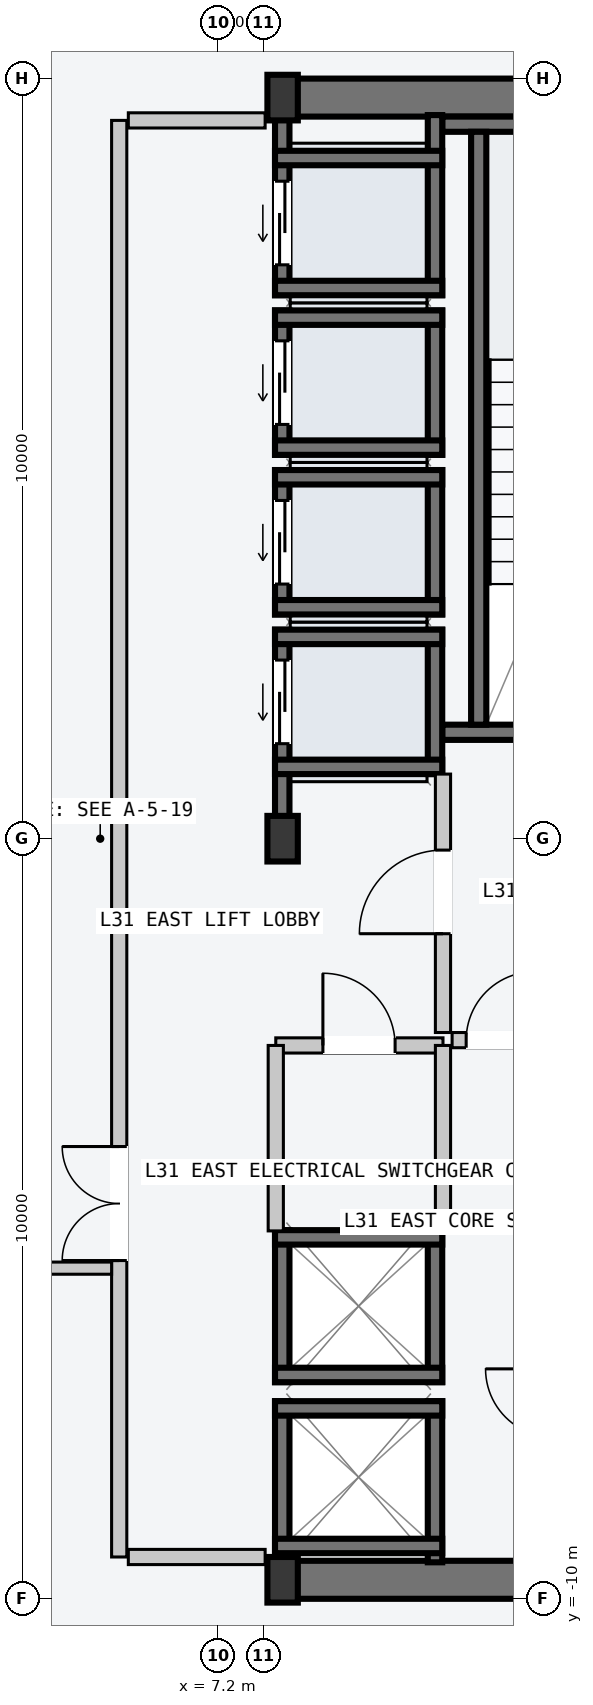
"""IFC4 building model, lengths in metres.
Left out: names, types, materials, properties, quantities, classifications, styles, units other than length and angle.
Written with IfcOpenShell. Run it as: python <this file> out.ifc"""

import sys

from ifc_helpers import new_model, si_unit, direction, frame, frame_2d, origin, origin_2d, place, context, subcontext, project, spatial, rectangle, i_section, extrude, element, fill, save


model = new_model("IFC4")
c1 = context("Model", 3, precision=1e-05, world=origin(), true_north=direction((0.0, 1.0)))
c2 = subcontext(c1, "Body", "Model", "MODEL_VIEW")
j1 = project(units=[si_unit("LENGTHUNIT", "METRE"), si_unit("PLANEANGLEUNIT", "RADIAN")], contexts=[c1])
p1 = place(None, origin())
s1 = spatial("IfcSite", under=j1, at=p1, CompositionType="ELEMENT")
p2 = place(p1, origin())
s2 = spatial("IfcBuilding", under=s1, at=p2, CompositionType="ELEMENT")
p3 = place(p2, frame((0.0, 0.0, 120.6)))
s3 = spatial("IfcBuildingStorey", under=s2, at=p3, CompositionType="ELEMENT", Elevation=120.6)
for number, where, z_axis, x_axis in (
    (1, (8.07, -9.75, -0.2), (0.0, 0.0, 1.0), (1.0, 0.0, 0.0)),
    (2, (8.07, 9.75, -0.2), (0.0, 0.0, 1.0), (1.0, 0.0, 0.0)),
):
    element("IfcWall", number, at=place(p3, frame(where, z_axis=z_axis, x_axis=x_axis)), inside=s3, PredefinedType="SHEAR", context=c2, shape_type="SweptSolid", body=[
        extrude(rectangle(XDim=6.46, YDim=0.5, at=frame_2d((3.23, 0.0))), origin(), (0.0, 0.0, 1.0), 3.6),
    ])
p4 = place(p3, frame((10.15, 1.4, -0.2), z_axis=(0.0, 0.0, 1.0), x_axis=(1.0, 0.0, 0.0)))
e3 = element("IfcWall", 3, at=p4, inside=s3, PredefinedType="SOLIDWALL", context=c2, shape_type="SweptSolid", body=[
    extrude(rectangle(XDim=4.1, YDim=0.2, at=frame_2d((2.05, 0.0))), origin(), (0.0, 0.0, 1.0), 3.6),
])
p5 = place(p4, frame((1.5, 0.0, 0.2)))
e4 = element("IfcOpeningElement", 4, at=p5, cuts=e3, PredefinedType="OPENING", context=c2, shape_type="SweptSolid", body=[
    extrude(rectangle(XDim=1.12, YDim=2.18, at=frame_2d((0.56, 1.09))), frame((0.0, 0.11, 0.0), z_axis=(0.0, -1.0, 0.0), x_axis=(1.0, 0.0, 0.0)), (0.0, 0.0, 1.0), 0.22),
])
p6 = place(p3, frame((10.15, 9.4, -0.2), z_axis=(0.0, 0.0, 1.0), x_axis=(1.0, 0.0, 0.0)))
e5 = element("IfcWall", 5, at=p6, inside=s3, PredefinedType="SOLIDWALL", context=c2, shape_type="SweptSolid", body=[
    extrude(rectangle(XDim=4.1, YDim=0.2, at=frame_2d((2.05, 0.0))), origin(), (0.0, 0.0, 1.0), 3.6),
])
p7 = place(p3, frame((10.63, 1.5, -0.2), z_axis=(0.0, 0.0, 1.0), x_axis=(0.0, 1.0, 0.0)))
e6 = element("IfcWall", 6, at=p7, inside=s3, PredefinedType="SOLIDWALL", context=c2, shape_type="SweptSolid", body=[
    extrude(rectangle(XDim=7.8, YDim=0.2, at=frame_2d((3.9, 0.0))), origin(), (0.0, 0.0, 1.0), 3.6),
])
for number, where, z_axis, x_axis in (
    (7, (8.05, -9.75, 0.0), (0.0, 0.0, 1.0), (1.0, 0.0, 0.0)),
    (8, (8.05, 0.0, 0.0), (0.0, 0.0, 1.0), (1.0, 0.0, 0.0)),
    (9, (8.05, 9.75, 0.0), (0.0, 0.0, 1.0), (1.0, 0.0, 0.0)),
):
    element("IfcColumn", number, at=place(p3, frame(where, z_axis=z_axis, x_axis=x_axis)), inside=s3, PredefinedType="COLUMN", context=c2, shape_type="SweptSolid", body=[
        extrude(i_section(OverallWidth=0.4, OverallDepth=0.6, WebThickness=0.022, FlangeThickness=0.036, at=origin_2d()), origin(), (0.0, 0.0, 1.0), 3.6),
    ])
p8 = place(p3, frame((8.045, 0.21, -0.2), z_axis=(0.0, 0.0, 1.0), x_axis=(0.0, 1.0, 0.0)))
e10 = element("IfcWall", 10, at=p8, inside=s3, PredefinedType="SOLIDWALL", context=c2, shape_type="SweptSolid", body=[
    extrude(rectangle(XDim=2.54, YDim=0.19, at=frame_2d((1.27, 0.0))), origin(), (0.0, 0.0, 1.0), 3.6),
])
p9 = place(p8, frame((1.04, 0.0, 0.2)))
e11 = element("IfcOpeningElement", 11, at=p9, cuts=e10, PredefinedType="OPENING", context=c2, shape_type="SweptSolid", body=[
    extrude(rectangle(XDim=1.1, YDim=2.2, at=frame_2d((0.55, 1.1))), frame((0.0, 0.105, 0.0), z_axis=(0.0, -1.0, 0.0), x_axis=(1.0, 0.0, 0.0)), (0.0, 0.0, 1.0), 0.21),
])
p10 = place(p3, frame((10.055, 0.85, -0.2), z_axis=(0.0, 0.0, 1.0), x_axis=(0.0, 1.0, 0.0)))
e12 = element("IfcWall", 12, at=p10, inside=s3, PredefinedType="SOLIDWALL", context=c2, shape_type="SweptSolid", body=[
    extrude(rectangle(XDim=1.9, YDim=0.19, at=frame_2d((0.95, 0.0))), origin(), (0.0, 0.0, 1.0), 3.6),
])
for number, where, z_axis, x_axis in (
    (13, (7.95, 2.655, -0.2), (0.0, 0.0, 1.0), (1.0, 0.0, 0.0)),
    (14, (7.95, 0.945, -0.2), (0.0, 0.0, 1.0), (1.0, 0.0, 0.0)),
):
    element("IfcWall", number, at=place(p3, frame(where, z_axis=z_axis, x_axis=x_axis)), inside=s3, PredefinedType="SOLIDWALL", context=c2, shape_type="SweptSolid", body=[
        extrude(rectangle(XDim=2.2, YDim=0.19, at=frame_2d((1.1, 0.0))), origin(), (0.0, 0.0, 1.0), 3.6),
    ])
p11 = place(p3, frame((8.045, 2.95, -0.2), z_axis=(0.0, 0.0, 1.0), x_axis=(0.0, 1.0, 0.0)))
e15 = element("IfcWall", 15, at=p11, inside=s3, PredefinedType="SOLIDWALL", context=c2, shape_type="SweptSolid", body=[
    extrude(rectangle(XDim=1.9, YDim=0.19, at=frame_2d((0.95, 0.0))), origin(), (0.0, 0.0, 1.0), 3.6),
])
p12 = place(p11, frame((0.4, 0.0, 0.2)))
e16 = element("IfcOpeningElement", 16, at=p12, cuts=e15, PredefinedType="OPENING", context=c2, shape_type="SweptSolid", body=[
    extrude(rectangle(XDim=1.1, YDim=2.2, at=frame_2d((0.55, 1.1))), frame((0.0, 0.105, 0.0), z_axis=(0.0, -1.0, 0.0), x_axis=(1.0, 0.0, 0.0)), (0.0, 0.0, 1.0), 0.21),
])
p13 = place(p3, frame((10.055, 2.95, -0.2), z_axis=(0.0, 0.0, 1.0), x_axis=(0.0, 1.0, 0.0)))
e17 = element("IfcWall", 17, at=p13, inside=s3, PredefinedType="SOLIDWALL", context=c2, shape_type="SweptSolid", body=[
    extrude(rectangle(XDim=1.9, YDim=0.19, at=frame_2d((0.95, 0.0))), origin(), (0.0, 0.0, 1.0), 3.6),
])
for number, where, z_axis, x_axis in (
    (18, (7.95, 4.755, -0.2), (0.0, 0.0, 1.0), (1.0, 0.0, 0.0)),
    (19, (7.95, 3.045, -0.2), (0.0, 0.0, 1.0), (1.0, 0.0, 0.0)),
):
    element("IfcWall", number, at=place(p3, frame(where, z_axis=z_axis, x_axis=x_axis)), inside=s3, PredefinedType="SOLIDWALL", context=c2, shape_type="SweptSolid", body=[
        extrude(rectangle(XDim=2.2, YDim=0.19, at=frame_2d((1.1, 0.0))), origin(), (0.0, 0.0, 1.0), 3.6),
    ])
p14 = place(p3, frame((8.045, 5.05, -0.2), z_axis=(0.0, 0.0, 1.0), x_axis=(0.0, 1.0, 0.0)))
e20 = element("IfcWall", 20, at=p14, inside=s3, PredefinedType="SOLIDWALL", context=c2, shape_type="SweptSolid", body=[
    extrude(rectangle(XDim=1.9, YDim=0.19, at=frame_2d((0.95, 0.0))), origin(), (0.0, 0.0, 1.0), 3.6),
])
p15 = place(p14, frame((0.4, 0.0, 0.2)))
e21 = element("IfcOpeningElement", 21, at=p15, cuts=e20, PredefinedType="OPENING", context=c2, shape_type="SweptSolid", body=[
    extrude(rectangle(XDim=1.1, YDim=2.2, at=frame_2d((0.55, 1.1))), frame((0.0, 0.105, 0.0), z_axis=(0.0, -1.0, 0.0), x_axis=(1.0, 0.0, 0.0)), (0.0, 0.0, 1.0), 0.21),
])
p16 = place(p3, frame((10.055, 5.05, -0.2), z_axis=(0.0, 0.0, 1.0), x_axis=(0.0, 1.0, 0.0)))
e22 = element("IfcWall", 22, at=p16, inside=s3, PredefinedType="SOLIDWALL", context=c2, shape_type="SweptSolid", body=[
    extrude(rectangle(XDim=1.9, YDim=0.19, at=frame_2d((0.95, 0.0))), origin(), (0.0, 0.0, 1.0), 3.6),
])
for number, where, z_axis, x_axis in (
    (23, (7.95, 6.855, -0.2), (0.0, 0.0, 1.0), (1.0, 0.0, 0.0)),
    (24, (7.95, 5.145, -0.2), (0.0, 0.0, 1.0), (1.0, 0.0, 0.0)),
):
    element("IfcWall", number, at=place(p3, frame(where, z_axis=z_axis, x_axis=x_axis)), inside=s3, PredefinedType="SOLIDWALL", context=c2, shape_type="SweptSolid", body=[
        extrude(rectangle(XDim=2.2, YDim=0.19, at=frame_2d((1.1, 0.0))), origin(), (0.0, 0.0, 1.0), 3.6),
    ])
p17 = place(p3, frame((8.045, 7.15, -0.2), z_axis=(0.0, 0.0, 1.0), x_axis=(0.0, 1.0, 0.0)))
e25 = element("IfcWall", 25, at=p17, inside=s3, PredefinedType="SOLIDWALL", context=c2, shape_type="SweptSolid", body=[
    extrude(rectangle(XDim=2.37, YDim=0.19, at=frame_2d((1.185, 0.0))), origin(), (0.0, 0.0, 1.0), 3.6),
])
p18 = place(p17, frame((0.4, 0.0, 0.2)))
e26 = element("IfcOpeningElement", 26, at=p18, cuts=e25, PredefinedType="OPENING", context=c2, shape_type="SweptSolid", body=[
    extrude(rectangle(XDim=1.1, YDim=2.2, at=frame_2d((0.55, 1.1))), frame((0.0, 0.105, 0.0), z_axis=(0.0, -1.0, 0.0), x_axis=(1.0, 0.0, 0.0)), (0.0, 0.0, 1.0), 0.21),
])
p19 = place(p3, frame((10.055, 7.15, -0.2), z_axis=(0.0, 0.0, 1.0), x_axis=(0.0, 1.0, 0.0)))
e27 = element("IfcWall", 27, at=p19, inside=s3, PredefinedType="SOLIDWALL", context=c2, shape_type="SweptSolid", body=[
    extrude(rectangle(XDim=2.37, YDim=0.19, at=frame_2d((1.185, 0.0))), origin(), (0.0, 0.0, 1.0), 3.6),
])
for number, where, z_axis, x_axis in (
    (28, (7.95, 8.955, -0.2), (0.0, 0.0, 1.0), (1.0, 0.0, 0.0)),
    (29, (7.95, 7.245, -0.2), (0.0, 0.0, 1.0), (1.0, 0.0, 0.0)),
):
    element("IfcWall", number, at=place(p3, frame(where, z_axis=z_axis, x_axis=x_axis)), inside=s3, PredefinedType="SOLIDWALL", context=c2, shape_type="SweptSolid", body=[
        extrude(rectangle(XDim=2.2, YDim=0.19, at=frame_2d((1.1, 0.0))), origin(), (0.0, 0.0, 1.0), 3.6),
    ])
for number, where, z_axis, x_axis in (
    (30, (8.045, -9.52, -0.2), (0.0, 0.0, 1.0), (0.0, 1.0, 0.0)),
    (31, (10.055, -9.52, -0.2), (0.0, 0.0, 1.0), (0.0, 1.0, 0.0)),
):
    element("IfcWall", number, at=place(p3, frame(where, z_axis=z_axis, x_axis=x_axis)), inside=s3, PredefinedType="SOLIDWALL", context=c2, shape_type="SweptSolid", body=[
        extrude(rectangle(XDim=2.12, YDim=0.19, at=frame_2d((1.06, 0.0))), origin(), (0.0, 0.0, 1.0), 3.6),
    ])
for number, where, z_axis, x_axis in (
    (32, (7.95, -7.495, -0.2), (0.0, 0.0, 1.0), (1.0, 0.0, 0.0)),
    (33, (7.95, -9.305, -0.2), (0.0, 0.0, 1.0), (1.0, 0.0, 0.0)),
):
    element("IfcWall", number, at=place(p3, frame(where, z_axis=z_axis, x_axis=x_axis)), inside=s3, PredefinedType="SOLIDWALL", context=c2, shape_type="SweptSolid", body=[
        extrude(rectangle(XDim=2.2, YDim=0.19, at=frame_2d((1.1, 0.0))), origin(), (0.0, 0.0, 1.0), 3.6),
    ])
for number, where, z_axis, x_axis in (
    (34, (8.045, -7.15, -0.2), (0.0, 0.0, 1.0), (0.0, 1.0, 0.0)),
    (35, (10.055, -7.15, -0.2), (0.0, 0.0, 1.0), (0.0, 1.0, 0.0)),
):
    element("IfcWall", number, at=place(p3, frame(where, z_axis=z_axis, x_axis=x_axis)), inside=s3, PredefinedType="SOLIDWALL", context=c2, shape_type="SweptSolid", body=[
        extrude(rectangle(XDim=2.0, YDim=0.19, at=frame_2d((1.0, 0.0))), origin(), (0.0, 0.0, 1.0), 3.6),
    ])
for number, where, z_axis, x_axis in (
    (36, (7.95, -5.245, -0.2), (0.0, 0.0, 1.0), (1.0, 0.0, 0.0)),
    (37, (7.95, -7.055, -0.2), (0.0, 0.0, 1.0), (1.0, 0.0, 0.0)),
):
    element("IfcWall", number, at=place(p3, frame(where, z_axis=z_axis, x_axis=x_axis)), inside=s3, PredefinedType="SOLIDWALL", context=c2, shape_type="SweptSolid", body=[
        extrude(rectangle(XDim=2.2, YDim=0.19, at=frame_2d((1.1, 0.0))), origin(), (0.0, 0.0, 1.0), 3.6),
    ])
p20 = place(p3, frame((5.9, -9.45, 0.0), z_axis=(0.0, 0.0, 1.0), x_axis=(0.0, 1.0, 0.0)))
e38 = element("IfcWall", 38, at=p20, inside=s3, PredefinedType="PARTITIONING", context=c2, shape_type="SweptSolid", body=[
    extrude(rectangle(XDim=18.9, YDim=0.2, at=frame_2d((9.45, 0.0))), origin(), (0.0, 0.0, 1.0), 3.4),
])
p21 = place(p20, frame((3.9, 0.0, 0.0)))
e39 = element("IfcOpeningElement", 39, at=p21, cuts=e38, PredefinedType="OPENING", context=c2, shape_type="SweptSolid", body=[
    extrude(rectangle(XDim=1.5, YDim=2.2, at=frame_2d((0.75, 1.1))), frame((0.0, 0.11, 0.0), z_axis=(0.0, -1.0, 0.0), x_axis=(1.0, 0.0, 0.0)), (0.0, 0.0, 1.0), 0.22),
])
for number, where, z_axis, x_axis in (
    (40, (6.02, -9.45, 0.0), (0.0, 0.0, 1.0), (1.0, 0.0, 0.0)),
    (41, (6.02, 9.45, 0.0), (0.0, 0.0, 1.0), (1.0, 0.0, 0.0)),
):
    element("IfcWall", number, at=place(p3, frame(where, z_axis=z_axis, x_axis=x_axis)), inside=s3, PredefinedType="PARTITIONING", context=c2, shape_type="SweptSolid", body=[
        extrude(rectangle(XDim=1.8, YDim=0.2, at=frame_2d((0.9, 0.0))), origin(), (0.0, 0.0, 1.0), 3.4),
    ])
p22 = place(p3, frame((10.16, -2.55, 0.0), z_axis=(0.0, 0.0, 1.0), x_axis=(0.0, 1.0, 0.0)))
e42 = element("IfcWall", 42, at=p22, inside=s3, PredefinedType="PARTITIONING", context=c2, shape_type="SweptSolid", body=[
    extrude(rectangle(XDim=3.4, YDim=0.2, at=frame_2d((1.7, 0.0))), origin(), (0.0, 0.0, 1.0), 3.4),
])
p23 = place(p22, frame((1.3, 0.0, 0.0)))
e43 = element("IfcOpeningElement", 43, at=p23, cuts=e42, PredefinedType="OPENING", context=c2, shape_type="SweptSolid", body=[
    extrude(rectangle(XDim=1.1, YDim=2.15, at=frame_2d((0.55, 1.075))), frame((0.0, 0.11, 0.0), z_axis=(0.0, -1.0, 0.0), x_axis=(1.0, 0.0, 0.0)), (0.0, 0.0, 1.0), 0.22),
])
p24 = place(p3, frame((10.28, -2.65, 0.0), z_axis=(0.0, 0.0, 1.0), x_axis=(1.0, 0.0, 0.0)))
e44 = element("IfcWall", 44, at=p24, inside=s3, PredefinedType="PARTITIONING", context=c2, shape_type="SweptSolid", body=[
    extrude(rectangle(XDim=1.27, YDim=0.2, at=frame_2d((0.635, 0.0))), origin(), (0.0, 0.0, 1.0), 3.4),
])
p25 = place(p24, frame((0.185, 0.0, 0.0)))
e45 = element("IfcOpeningElement", 45, at=p25, cuts=e44, PredefinedType="OPENING", context=c2, shape_type="SweptSolid", body=[
    extrude(rectangle(XDim=0.9, YDim=2.15, at=frame_2d((0.45, 1.075))), frame((0.0, 0.11, 0.0), z_axis=(0.0, -1.0, 0.0), x_axis=(1.0, 0.0, 0.0)), (0.0, 0.0, 1.0), 0.22),
])
p26 = place(p3, frame((7.96, -2.72, 0.0), z_axis=(0.0, 0.0, 1.0), x_axis=(1.0, 0.0, 0.0)))
e46 = element("IfcWall", 46, at=p26, inside=s3, PredefinedType="PARTITIONING", context=c2, shape_type="SweptSolid", body=[
    extrude(rectangle(XDim=2.2, YDim=0.2, at=frame_2d((1.1, 0.0))), origin(), (0.0, 0.0, 1.0), 3.4),
])
p27 = place(p26, frame((0.62, 0.0, 0.0)))
e47 = element("IfcOpeningElement", 47, at=p27, cuts=e46, PredefinedType="OPENING", context=c2, shape_type="SweptSolid", body=[
    extrude(rectangle(XDim=0.95, YDim=2.1, at=frame_2d((0.475, 1.05))), frame((0.0, 0.11, 0.0), z_axis=(0.0, -1.0, 0.0), x_axis=(1.0, 0.0, 0.0)), (0.0, 0.0, 1.0), 0.22),
])
for number, where, z_axis, x_axis in (
    (48, (7.96, -5.16, 0.0), (0.0, 0.0, 1.0), (0.0, 1.0, 0.0)),
    (49, (10.16, -5.16, 0.0), (0.0, 0.0, 1.0), (0.0, 1.0, 0.0)),
):
    element("IfcWall", number, at=place(p3, frame(where, z_axis=z_axis, x_axis=x_axis)), inside=s3, PredefinedType="PARTITIONING", context=c2, shape_type="SweptSolid", body=[
        extrude(rectangle(XDim=2.44, YDim=0.2, at=frame_2d((1.22, 0.0))), origin(), (0.0, 0.0, 1.0), 3.4),
    ])
p28 = place(p3, frame((-5.8, -5.65, 0.0), z_axis=(0.0, 0.0, 1.0), x_axis=(1.0, 0.0, 0.0)))
e50 = element("IfcWall", 50, at=p28, inside=s3, PredefinedType="PARTITIONING", context=c2, shape_type="SweptSolid", body=[
    extrude(rectangle(XDim=11.6, YDim=0.16, at=frame_2d((5.8, 0.0))), origin(), (0.0, 0.0, 1.0), 3.4),
])
p29 = place(p28, frame((5.1, 0.0, 0.0)))
e51 = element("IfcOpeningElement", 51, at=p29, cuts=e50, PredefinedType="OPENING", context=c2, shape_type="SweptSolid", body=[
    extrude(rectangle(XDim=1.4, YDim=2.2, at=frame_2d((0.7, 1.1))), frame((0.0, 0.09, 0.0), z_axis=(0.0, -1.0, 0.0), x_axis=(1.0, 0.0, 0.0)), (0.0, 0.0, 1.0), 0.18),
])
p30 = place(p9, origin())
e52 = element("IfcDoor", 52, at=p30, inside=s3, OperationType="SLIDING_TO_LEFT", PredefinedType="DOOR", context=c2, shape_type="SweptSolid", body=[
    extrude(rectangle(XDim=1.1, YDim=2.2, at=frame_2d((0.55, 1.1))), frame((0.0, 0.025, 0.0), z_axis=(0.0, -1.0, 0.0), x_axis=(1.0, 0.0, 0.0)), (0.0, 0.0, 1.0), 0.05),
])
fill(e11, e52)
p31 = place(p12, origin())
e53 = element("IfcDoor", 53, at=p31, inside=s3, OperationType="SLIDING_TO_LEFT", PredefinedType="DOOR", context=c2, shape_type="SweptSolid", body=[
    extrude(rectangle(XDim=1.1, YDim=2.2, at=frame_2d((0.55, 1.1))), frame((0.0, 0.025, 0.0), z_axis=(0.0, -1.0, 0.0), x_axis=(1.0, 0.0, 0.0)), (0.0, 0.0, 1.0), 0.05),
])
fill(e16, e53)
p32 = place(p15, origin())
e54 = element("IfcDoor", 54, at=p32, inside=s3, OperationType="SLIDING_TO_LEFT", PredefinedType="DOOR", context=c2, shape_type="SweptSolid", body=[
    extrude(rectangle(XDim=1.1, YDim=2.2, at=frame_2d((0.55, 1.1))), frame((0.0, 0.025, 0.0), z_axis=(0.0, -1.0, 0.0), x_axis=(1.0, 0.0, 0.0)), (0.0, 0.0, 1.0), 0.05),
])
fill(e21, e54)
p33 = place(p18, origin())
e55 = element("IfcDoor", 55, at=p33, inside=s3, OperationType="SLIDING_TO_LEFT", PredefinedType="DOOR", context=c2, shape_type="SweptSolid", body=[
    extrude(rectangle(XDim=1.1, YDim=2.2, at=frame_2d((0.55, 1.1))), frame((0.0, 0.025, 0.0), z_axis=(0.0, -1.0, 0.0), x_axis=(1.0, 0.0, 0.0)), (0.0, 0.0, 1.0), 0.05),
])
fill(e26, e55)
p34 = place(p21, origin())
e56 = element("IfcDoor", 56, at=p34, inside=s3, OperationType="DOUBLE_DOOR_SINGLE_SWING", PredefinedType="DOOR", context=c2, shape_type="SweptSolid", body=[
    extrude(rectangle(XDim=1.5, YDim=2.2, at=frame_2d((0.75, 1.1))), frame((0.0, 0.025, 0.0), z_axis=(0.0, -1.0, 0.0), x_axis=(1.0, 0.0, 0.0)), (0.0, 0.0, 1.0), 0.05),
])
fill(e39, e56)
p35 = place(p23, origin())
e57 = element("IfcDoor", 57, at=p35, inside=s3, OperationType="SINGLE_SWING_LEFT", PredefinedType="DOOR", context=c2, shape_type="SweptSolid", body=[
    extrude(rectangle(XDim=1.1, YDim=2.15, at=frame_2d((0.55, 1.075))), frame((0.0, 0.025, 0.0), z_axis=(0.0, -1.0, 0.0), x_axis=(1.0, 0.0, 0.0)), (0.0, 0.0, 1.0), 0.05),
])
fill(e43, e57)
p36 = place(p25, origin())
e58 = element("IfcDoor", 58, at=p36, inside=s3, OperationType="SINGLE_SWING_RIGHT", PredefinedType="DOOR", context=c2, shape_type="SweptSolid", body=[
    extrude(rectangle(XDim=0.9, YDim=2.15, at=frame_2d((0.45, 1.075))), frame((0.0, 0.025, 0.0), z_axis=(0.0, -1.0, 0.0), x_axis=(1.0, 0.0, 0.0)), (0.0, 0.0, 1.0), 0.05),
])
fill(e45, e58)
p37 = place(p27, origin())
e59 = element("IfcDoor", 59, at=p37, inside=s3, OperationType="SINGLE_SWING_LEFT", PredefinedType="DOOR", context=c2, shape_type="SweptSolid", body=[
    extrude(rectangle(XDim=0.95, YDim=2.1, at=frame_2d((0.475, 1.05))), frame((0.0, 0.025, 0.0), z_axis=(0.0, -1.0, 0.0), x_axis=(1.0, 0.0, 0.0)), (0.0, 0.0, 1.0), 0.05),
])
fill(e47, e59)
save(model, sys.argv[1])
